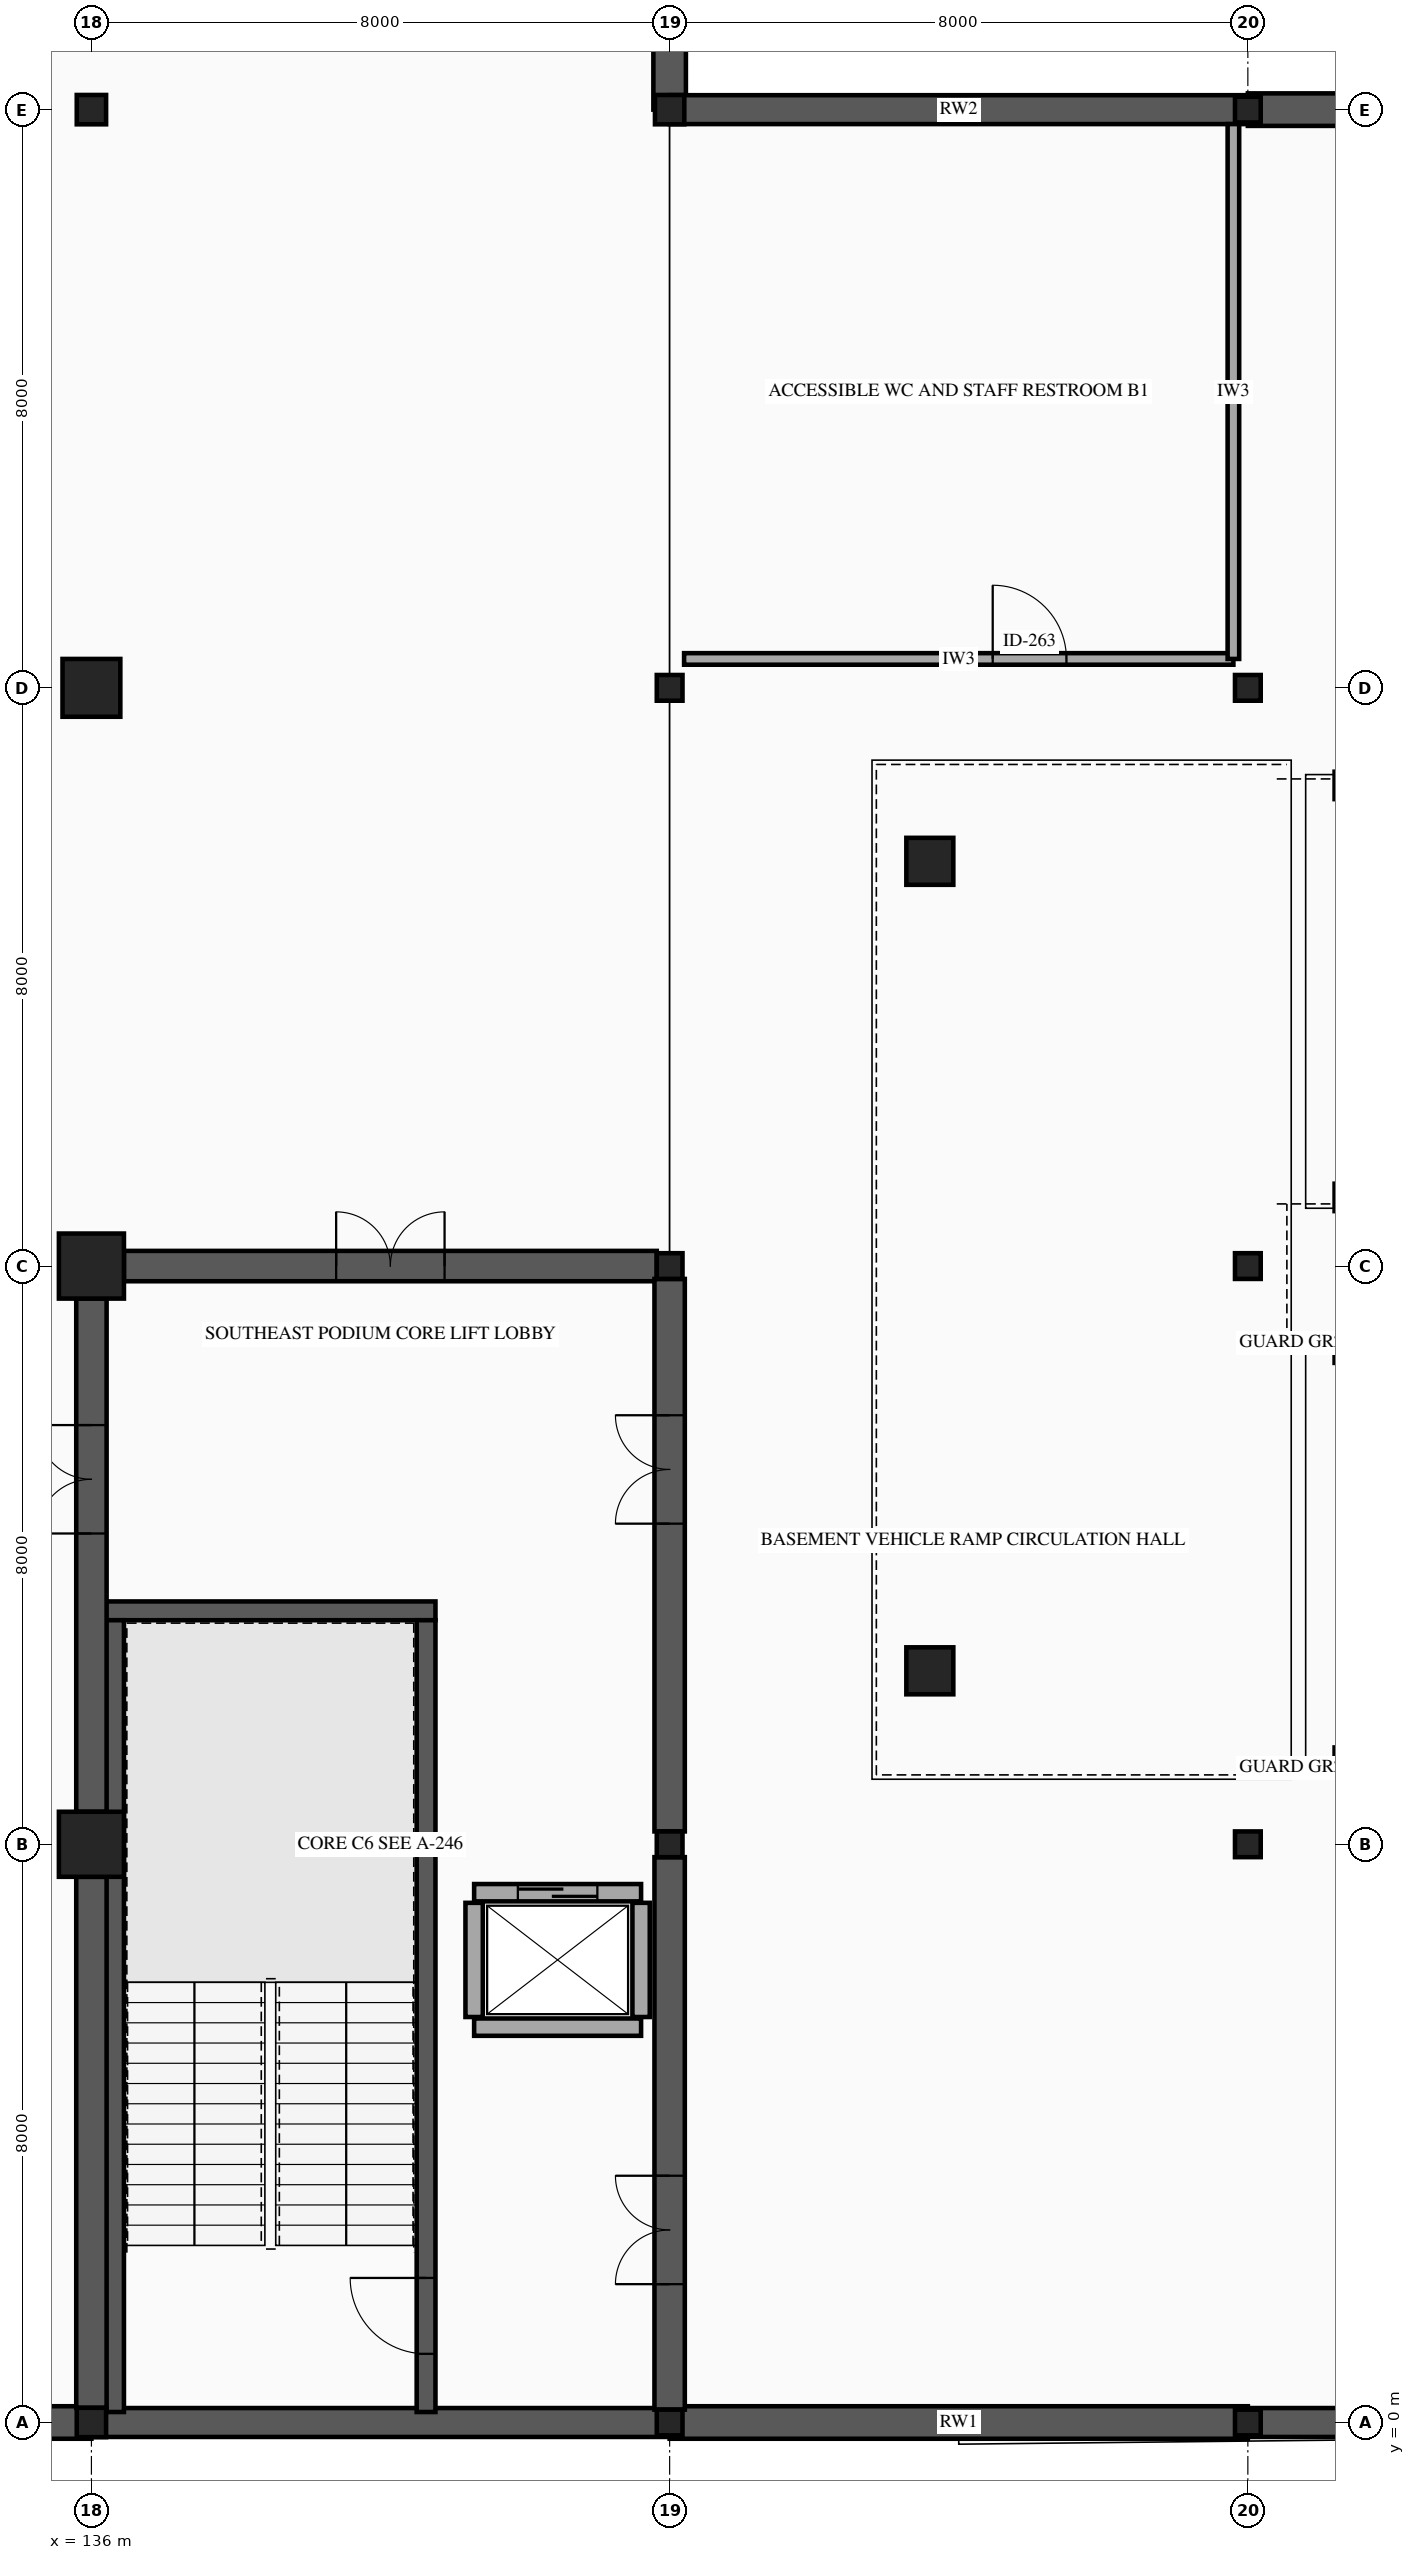
"""IFC4 building model, lengths in metres.
Left out: names, types, materials, properties, quantities, classifications, styles, units other than length and angle.
Written with IfcOpenShell. Run it as: python <this file> out.ifc"""

import sys

from ifc_helpers import new_model, si_unit, direction, frame, frame_2d, origin, origin_2d, place, context, subcontext, project, spatial, rectangle, hollow_rectangle, hollow_circle, extrude, element, fill, save


model = new_model("IFC4")
c1 = context("Model", 3, precision=1e-05, world=origin(), true_north=direction((0.0, 1.0)))
c2 = subcontext(c1, "Body", "Model", "MODEL_VIEW")
j1 = project(units=[si_unit("LENGTHUNIT", "METRE"), si_unit("PLANEANGLEUNIT", "RADIAN")], contexts=[c1])
p1 = place(None, origin())
s1 = spatial("IfcSite", under=j1, at=p1, CompositionType="ELEMENT")
p2 = place(p1, origin())
s2 = spatial("IfcBuilding", under=s1, at=p2, CompositionType="ELEMENT")
p3 = place(p2, frame((0.0, 0.0, -4.8)))
s3 = spatial("IfcBuildingStorey", under=s2, at=p3, CompositionType="ELEMENT", Elevation=-4.8)
p4 = place(p3, frame((136.0, 0.0, 0.0), z_axis=(0.0, 0.0, 1.0), x_axis=(1.0, 0.0, 0.0)))
e1 = element("IfcColumn", 1, at=p4, inside=s3, PredefinedType="COLUMN", context=c2, shape_type="SweptSolid", body=[
    extrude(hollow_rectangle(XDim=0.406, YDim=0.406, WallThickness=0.015, InnerFilletRadius=0.015, OuterFilletRadius=0.029, at=origin_2d()), origin(), (0.0, 0.0, 1.0), 4.8),
])
for number, where, z_axis, x_axis in (
    (2, (136.0, 8.0, 0.0), (0.0, 0.0, 1.0), (1.0, 0.0, 0.0)),
    (3, (136.0, 16.0, 0.0), (0.0, 0.0, 1.0), (1.0, 0.0, 0.0)),
):
    element("IfcColumn", number, at=place(p3, frame(where, z_axis=z_axis, x_axis=x_axis)), inside=s3, PredefinedType="COLUMN", context=c2, shape_type="SweptSolid", body=[
        extrude(rectangle(XDim=0.9, YDim=0.9, at=origin_2d()), origin(), (0.0, 0.0, 1.0), 4.8),
    ])
p5 = place(p3, frame((136.0, 24.0, 0.0), z_axis=(0.0, 0.0, 1.0), x_axis=(1.0, 0.0, 0.0)))
e4 = element("IfcColumn", 4, at=p5, inside=s3, PredefinedType="COLUMN", context=c2, shape_type="SweptSolid", body=[
    extrude(rectangle(XDim=0.8, YDim=0.8, at=origin_2d()), origin(), (0.0, 0.0, 1.0), 4.8),
])
p6 = place(p3, frame((136.0, 32.0, 0.0), z_axis=(0.0, 0.0, 1.0), x_axis=(1.0, 0.0, 0.0)))
e5 = element("IfcColumn", 5, at=p6, inside=s3, PredefinedType="COLUMN", context=c2, shape_type="SweptSolid", body=[
    extrude(hollow_circle(Radius=0.203, WallThickness=0.012, at=origin_2d()), origin(), (0.0, 0.0, 1.0), 4.8),
])
for number, where, z_axis, x_axis in (
    (6, (144.0, 0.0, 0.0), (0.0, 0.0, 1.0), (1.0, 0.0, 0.0)),
    (7, (144.0, 8.0, 0.0), (0.0, 0.0, 1.0), (1.0, 0.0, 0.0)),
    (8, (144.0, 16.0, 0.0), (0.0, 0.0, 1.0), (1.0, 0.0, 0.0)),
    (9, (144.0, 24.0, 0.0), (0.0, 0.0, 1.0), (1.0, 0.0, 0.0)),
):
    element("IfcColumn", number, at=place(p3, frame(where, z_axis=z_axis, x_axis=x_axis)), inside=s3, PredefinedType="COLUMN", context=c2, shape_type="SweptSolid", body=[
        extrude(hollow_rectangle(XDim=0.356, YDim=0.356, WallThickness=0.012, InnerFilletRadius=0.012, OuterFilletRadius=0.024, at=origin_2d()), origin(), (0.0, 0.0, 1.0), 4.8),
    ])
p7 = place(p3, frame((144.0, 32.0, 0.0), z_axis=(0.0, 0.0, 1.0), x_axis=(1.0, 0.0, 0.0)))
e10 = element("IfcColumn", 10, at=p7, inside=s3, PredefinedType="COLUMN", context=c2, shape_type="SweptSolid", body=[
    extrude(hollow_circle(Radius=0.203, WallThickness=0.012, at=origin_2d()), origin(), (0.0, 0.0, 1.0), 4.8),
])
for number, where, z_axis, x_axis in (
    (11, (152.0, 0.0, 0.0), (0.0, 0.0, 1.0), (1.0, 0.0, 0.0)),
    (12, (152.0, 8.0, 0.0), (0.0, 0.0, 1.0), (1.0, 0.0, 0.0)),
    (13, (152.0, 16.0, 0.0), (0.0, 0.0, 1.0), (1.0, 0.0, 0.0)),
    (14, (152.0, 24.0, 0.0), (0.0, 0.0, 1.0), (1.0, 0.0, 0.0)),
    (15, (152.0, 32.0, 0.0), (0.0, 0.0, 1.0), (1.0, 0.0, 0.0)),
):
    element("IfcColumn", number, at=place(p3, frame(where, z_axis=z_axis, x_axis=x_axis)), inside=s3, PredefinedType="COLUMN", context=c2, shape_type="SweptSolid", body=[
        extrude(hollow_rectangle(XDim=0.356, YDim=0.356, WallThickness=0.012, InnerFilletRadius=0.012, OuterFilletRadius=0.024, at=origin_2d()), origin(), (0.0, 0.0, 1.0), 4.8),
    ])
p8 = place(p3, frame((160.0, 0.0, 0.0), z_axis=(0.0, 0.0, 1.0), x_axis=(-1.0, 0.0, 0.0)))
e16 = element("IfcWall", 16, at=p8, inside=s3, PredefinedType="USERDEFINED", context=c2, shape_type="SweptSolid", body=[
    extrude(rectangle(XDim=8.0, YDim=0.4, at=frame_2d((4.0, 0.0))), origin(), (0.0, 0.0, 1.0), 4.5),
])
p9 = place(p3, frame((152.0, 0.0, 0.0), z_axis=(0.0, 0.0, 1.0), x_axis=(-1.0, 0.0, 0.0)))
e17 = element("IfcWall", 17, at=p9, inside=s3, PredefinedType="USERDEFINED", context=c2, shape_type="SweptSolid", body=[
    extrude(rectangle(XDim=8.0, YDim=0.45, at=frame_2d((4.0, 0.0))), origin(), (0.0, 0.0, 1.0), 4.5),
])
p10 = place(p3, frame((144.0, 0.0, 0.0), z_axis=(0.0, 0.0, 1.0), x_axis=(-1.0, 0.0, 0.0)))
e18 = element("IfcWall", 18, at=p10, inside=s3, PredefinedType="USERDEFINED", context=c2, shape_type="SweptSolid", body=[
    extrude(rectangle(XDim=8.0, YDim=0.4, at=frame_2d((4.0, 0.0))), origin(), (0.0, 0.0, 1.0), 4.5),
])
for number, where, z_axis, x_axis in (
    (19, (136.0, 0.0, 0.0), (0.0, 0.0, 1.0), (-1.0, 0.0, 0.0)),
    (20, (144.0, 40.0, 0.0), (0.0, 0.0, 1.0), (0.0, -1.0, 0.0)),
):
    element("IfcWall", number, at=place(p3, frame(where, z_axis=z_axis, x_axis=x_axis)), inside=s3, PredefinedType="USERDEFINED", context=c2, shape_type="SweptSolid", body=[
        extrude(rectangle(XDim=8.0, YDim=0.45, at=frame_2d((4.0, 0.0))), origin(), (0.0, 0.0, 1.0), 4.5),
    ])
p11 = place(p3, frame((144.0, 32.0, 0.0), z_axis=(0.0, 0.0, 1.0), x_axis=(1.0, 0.0, 0.0)))
e21 = element("IfcWall", 21, at=p11, inside=s3, PredefinedType="USERDEFINED", context=c2, shape_type="SweptSolid", body=[
    extrude(rectangle(XDim=8.0, YDim=0.4, at=frame_2d((4.0, 0.0))), origin(), (0.0, 0.0, 1.0), 4.5),
])
p12 = place(p3, frame((152.0, 32.0, 0.0), z_axis=(0.0, 0.0, 1.0), x_axis=(1.0, 0.0, 0.0)))
e22 = element("IfcWall", 22, at=p12, inside=s3, PredefinedType="USERDEFINED", context=c2, shape_type="SweptSolid", body=[
    extrude(rectangle(XDim=8.0, YDim=0.45, at=frame_2d((4.0, 0.0))), origin(), (0.0, 0.0, 1.0), 4.5),
])
p13 = place(p3, frame((136.19, 11.23, 0.0), z_axis=(0.0, 0.0, 1.0), x_axis=(1.0, 0.0, 0.0)))
e23 = element("IfcWall", 23, at=p13, inside=s3, PredefinedType="SHEAR", context=c2, shape_type="SweptSolid", body=[
    extrude(rectangle(XDim=4.57, YDim=0.26, at=frame_2d((2.285, 0.0))), origin(), (0.0, 0.0, 1.0), 4.58),
])
p14 = place(p3, frame((136.32, 0.145, 0.0), z_axis=(0.0, 0.0, 1.0), x_axis=(0.0, 1.0, 0.0)))
e24 = element("IfcWall", 24, at=p14, inside=s3, PredefinedType="SHEAR", context=c2, shape_type="SweptSolid", body=[
    extrude(rectangle(XDim=10.955, YDim=0.26, at=frame_2d((5.478, 0.0))), origin(), (0.0, 0.0, 1.0), 4.58),
])
p15 = place(p3, frame((140.63, 0.145, 0.0), z_axis=(0.0, 0.0, 1.0), x_axis=(0.0, 1.0, 0.0)))
e25 = element("IfcWall", 25, at=p15, inside=s3, PredefinedType="SHEAR", context=c2, shape_type="SweptSolid", body=[
    extrude(rectangle(XDim=10.955, YDim=0.26, at=frame_2d((5.478, 0.0))), origin(), (0.0, 0.0, 1.0), 4.58),
])
p16 = place(p15, frame((0.805, 0.0, 0.0)))
e26 = element("IfcOpeningElement", 26, at=p16, cuts=e25, PredefinedType="OPENING", context=c2, shape_type="SweptSolid", body=[
    extrude(rectangle(XDim=1.05, YDim=2.15, at=frame_2d((0.525, 1.075))), frame((0.0, 0.14, 0.0), z_axis=(0.0, -1.0, 0.0), x_axis=(1.0, 0.0, 0.0)), (0.0, 0.0, 1.0), 0.28),
])
p17 = place(p3, frame((136.45, 16.0, 0.0), z_axis=(0.0, 0.0, 1.0), x_axis=(1.0, 0.0, 0.0)))
e27 = element("IfcWall", 27, at=p17, inside=s3, PredefinedType="SHEAR", context=c2, shape_type="SweptSolid", body=[
    extrude(rectangle(XDim=7.372, YDim=0.42, at=frame_2d((3.686, 0.0))), origin(), (0.0, 0.0, 1.0), 4.58),
])
p18 = place(p17, frame((2.936, 0.0, 0.0)))
e28 = element("IfcOpeningElement", 28, at=p18, cuts=e27, PredefinedType="OPENING", context=c2, shape_type="SweptSolid", body=[
    extrude(rectangle(XDim=1.5, YDim=2.15, at=frame_2d((0.75, 1.075))), frame((0.0, 0.22, 0.0), z_axis=(0.0, -1.0, 0.0), x_axis=(1.0, 0.0, 0.0)), (0.0, 0.0, 1.0), 0.44),
])
p19 = place(p3, frame((136.0, 0.203, 0.0), z_axis=(0.0, 0.0, 1.0), x_axis=(0.0, 1.0, 0.0)))
e29 = element("IfcWall", 29, at=p19, inside=s3, PredefinedType="SHEAR", context=c2, shape_type="SweptSolid", body=[
    extrude(rectangle(XDim=7.347, YDim=0.42, at=frame_2d((3.674, 0.0))), origin(), (0.0, 0.0, 1.0), 4.58),
])
p20 = place(p3, frame((136.0, 8.45, 0.0), z_axis=(0.0, 0.0, 1.0), x_axis=(0.0, 1.0, 0.0)))
e30 = element("IfcWall", 30, at=p20, inside=s3, PredefinedType="SHEAR", context=c2, shape_type="SweptSolid", body=[
    extrude(rectangle(XDim=7.1, YDim=0.42, at=frame_2d((3.55, 0.0))), origin(), (0.0, 0.0, 1.0), 4.58),
])
p21 = place(p20, frame((3.85, 0.0, 0.0)))
e31 = element("IfcOpeningElement", 31, at=p21, cuts=e30, PredefinedType="OPENING", context=c2, shape_type="SweptSolid", body=[
    extrude(rectangle(XDim=1.5, YDim=2.15, at=frame_2d((0.75, 1.075))), frame((0.0, 0.22, 0.0), z_axis=(0.0, -1.0, 0.0), x_axis=(1.0, 0.0, 0.0)), (0.0, 0.0, 1.0), 0.44),
])
p22 = place(p3, frame((144.0, 0.178, 0.0), z_axis=(0.0, 0.0, 1.0), x_axis=(0.0, 1.0, 0.0)))
e32 = element("IfcWall", 32, at=p22, inside=s3, PredefinedType="SHEAR", context=c2, shape_type="SweptSolid", body=[
    extrude(rectangle(XDim=7.644, YDim=0.42, at=frame_2d((3.822, 0.0))), origin(), (0.0, 0.0, 1.0), 4.58),
])
p23 = place(p22, frame((1.736, 0.0, 0.0)))
e33 = element("IfcOpeningElement", 33, at=p23, cuts=e32, PredefinedType="OPENING", context=c2, shape_type="SweptSolid", body=[
    extrude(rectangle(XDim=1.5, YDim=2.15, at=frame_2d((0.75, 1.075))), frame((0.0, 0.22, 0.0), z_axis=(0.0, -1.0, 0.0), x_axis=(1.0, 0.0, 0.0)), (0.0, 0.0, 1.0), 0.44),
])
p24 = place(p3, frame((144.0, 8.178, 0.0), z_axis=(0.0, 0.0, 1.0), x_axis=(0.0, 1.0, 0.0)))
e34 = element("IfcWall", 34, at=p24, inside=s3, PredefinedType="SHEAR", context=c2, shape_type="SweptSolid", body=[
    extrude(rectangle(XDim=7.644, YDim=0.42, at=frame_2d((3.822, 0.0))), origin(), (0.0, 0.0, 1.0), 4.58),
])
p25 = place(p24, frame((4.258, 0.0, 0.0)))
e35 = element("IfcOpeningElement", 35, at=p25, cuts=e34, PredefinedType="OPENING", context=c2, shape_type="SweptSolid", body=[
    extrude(rectangle(XDim=1.5, YDim=2.15, at=frame_2d((0.75, 1.075))), frame((0.0, 0.22, 0.0), z_axis=(0.0, -1.0, 0.0), x_axis=(1.0, 0.0, 0.0)), (0.0, 0.0, 1.0), 0.44),
])
p26 = place(p3, frame((141.295, 7.33, 0.0), z_axis=(0.0, 0.0, 1.0), x_axis=(1.0, 0.0, 0.0)))
e36 = element("IfcWall", 36, at=p26, inside=s3, PredefinedType="PARTITIONING", context=c2, shape_type="SweptSolid", body=[
    extrude(rectangle(XDim=2.31, YDim=0.24, at=frame_2d((1.155, 0.0))), origin(), (0.0, 0.0, 1.0), 4.58),
])
p27 = place(p26, frame((0.605, 0.0, 0.0)))
e37 = element("IfcOpeningElement", 37, at=p27, cuts=e36, PredefinedType="OPENING", context=c2, shape_type="SweptSolid", body=[
    extrude(rectangle(XDim=1.1, YDim=2.15, at=frame_2d((0.55, 1.075))), frame((0.0, 0.13, 0.0), z_axis=(0.0, -1.0, 0.0), x_axis=(1.0, 0.0, 0.0)), (0.0, 0.0, 1.0), 0.26),
])
p28 = place(p3, frame((141.295, 5.47, 0.0), z_axis=(0.0, 0.0, 1.0), x_axis=(1.0, 0.0, 0.0)))
e38 = element("IfcWall", 38, at=p28, inside=s3, PredefinedType="PARTITIONING", context=c2, shape_type="SweptSolid", body=[
    extrude(rectangle(XDim=2.31, YDim=0.24, at=frame_2d((1.155, 0.0))), origin(), (0.0, 0.0, 1.0), 4.58),
])
for number, where, z_axis, x_axis in (
    (39, (141.295, 5.61, 0.0), (0.0, 0.0, 1.0), (0.0, 1.0, 0.0)),
    (40, (143.605, 5.61, 0.0), (0.0, 0.0, 1.0), (0.0, 1.0, 0.0)),
):
    element("IfcWall", number, at=place(p3, frame(where, z_axis=z_axis, x_axis=x_axis)), inside=s3, PredefinedType="PARTITIONING", context=c2, shape_type="SweptSolid", body=[
        extrude(rectangle(XDim=1.58, YDim=0.24, at=frame_2d((0.79, 0.0))), origin(), (0.0, 0.0, 1.0), 4.58),
    ])
for number, where, z_axis, x_axis in (
    (41, (147.6, 10.4, 0.0), (0.0, 0.0, 1.0), (1.0, 0.0, 0.0)),
    (42, (147.6, 21.6, 0.0), (0.0, 0.0, 1.0), (1.0, 0.0, 0.0)),
):
    element("IfcColumn", number, at=place(p3, frame(where, z_axis=z_axis, x_axis=x_axis)), inside=s3, PredefinedType="COLUMN", context=c2, shape_type="SweptSolid", body=[
        extrude(rectangle(XDim=0.65, YDim=0.65, at=origin_2d()), origin(), (0.0, 0.0, 1.0), 2.05),
    ])
p29 = place(p3, frame((144.2, 24.4, 0.0), z_axis=(0.0, 0.0, 1.0), x_axis=(1.0, 0.0, 0.0)))
e43 = element("IfcWall", 43, at=p29, inside=s3, PredefinedType="PARTITIONING", context=c2, shape_type="SweptSolid", body=[
    extrude(rectangle(XDim=7.6, YDim=0.16, at=frame_2d((3.8, 0.0))), origin(), (0.0, 0.0, 1.0), 3.78),
])
p30 = place(p29, frame((4.27, 0.0, 0.0)))
e44 = element("IfcOpeningElement", 44, at=p30, cuts=e43, PredefinedType="OPENING", context=c2, shape_type="SweptSolid", body=[
    extrude(rectangle(XDim=1.02, YDim=2.1, at=frame_2d((0.51, 1.05))), frame((0.0, 0.09, 0.0), z_axis=(0.0, -1.0, 0.0), x_axis=(1.0, 0.0, 0.0)), (0.0, 0.0, 1.0), 0.18),
])
p31 = place(p3, frame((151.8, 24.4, 0.0), z_axis=(0.0, 0.0, 1.0), x_axis=(0.0, 1.0, 0.0)))
e45 = element("IfcWall", 45, at=p31, inside=s3, PredefinedType="PARTITIONING", context=c2, shape_type="SweptSolid", body=[
    extrude(rectangle(XDim=7.4, YDim=0.16, at=frame_2d((3.7, 0.0))), origin(), (0.0, 0.0, 1.0), 3.78),
])
p32 = place(p16, origin())
e46 = element("IfcDoor", 46, at=p32, inside=s3, OperationType="SINGLE_SWING_RIGHT", PredefinedType="DOOR", context=c2, shape_type="SweptSolid", body=[
    extrude(rectangle(XDim=1.05, YDim=2.15, at=frame_2d((0.525, 1.075))), frame((0.0, 0.025, 0.0), z_axis=(0.0, -1.0, 0.0), x_axis=(1.0, 0.0, 0.0)), (0.0, 0.0, 1.0), 0.05),
])
fill(e26, e46)
p33 = place(p18, origin())
e47 = element("IfcDoor", 47, at=p33, inside=s3, OperationType="DOUBLE_DOOR_SINGLE_SWING", PredefinedType="DOOR", context=c2, shape_type="SweptSolid", body=[
    extrude(rectangle(XDim=1.5, YDim=2.15, at=frame_2d((0.75, 1.075))), frame((0.0, 0.025, 0.0), z_axis=(0.0, -1.0, 0.0), x_axis=(1.0, 0.0, 0.0)), (0.0, 0.0, 1.0), 0.05),
])
fill(e28, e47)
p34 = place(p21, origin())
e48 = element("IfcDoor", 48, at=p34, inside=s3, OperationType="DOUBLE_DOOR_SINGLE_SWING", PredefinedType="DOOR", context=c2, shape_type="SweptSolid", body=[
    extrude(rectangle(XDim=1.5, YDim=2.15, at=frame_2d((0.75, 1.075))), frame((0.0, 0.025, 0.0), z_axis=(0.0, -1.0, 0.0), x_axis=(1.0, 0.0, 0.0)), (0.0, 0.0, 1.0), 0.05),
])
fill(e31, e48)
p35 = place(p23, origin())
e49 = element("IfcDoor", 49, at=p35, inside=s3, OperationType="DOUBLE_DOOR_SINGLE_SWING", PredefinedType="DOOR", context=c2, shape_type="SweptSolid", body=[
    extrude(rectangle(XDim=1.5, YDim=2.15, at=frame_2d((0.75, 1.075))), frame((0.0, 0.025, 0.0), z_axis=(0.0, -1.0, 0.0), x_axis=(1.0, 0.0, 0.0)), (0.0, 0.0, 1.0), 0.05),
])
fill(e33, e49)
p36 = place(p25, origin())
e50 = element("IfcDoor", 50, at=p36, inside=s3, OperationType="DOUBLE_DOOR_SINGLE_SWING", PredefinedType="DOOR", context=c2, shape_type="SweptSolid", body=[
    extrude(rectangle(XDim=1.5, YDim=2.15, at=frame_2d((0.75, 1.075))), frame((0.0, 0.025, 0.0), z_axis=(0.0, -1.0, 0.0), x_axis=(1.0, 0.0, 0.0)), (0.0, 0.0, 1.0), 0.05),
])
fill(e35, e50)
p37 = place(p27, origin())
e51 = element("IfcDoor", 51, at=p37, inside=s3, OperationType="SLIDING_TO_LEFT", PredefinedType="DOOR", context=c2, shape_type="SweptSolid", body=[
    extrude(rectangle(XDim=1.1, YDim=2.15, at=frame_2d((0.55, 1.075))), frame((0.0, 0.025, 0.0), z_axis=(0.0, -1.0, 0.0), x_axis=(1.0, 0.0, 0.0)), (0.0, 0.0, 1.0), 0.05),
])
fill(e37, e51)
p38 = place(p30, origin())
e52 = element("IfcDoor", 52, at=p38, inside=s3, OperationType="SINGLE_SWING_LEFT", PredefinedType="DOOR", context=c2, shape_type="SweptSolid", body=[
    extrude(rectangle(XDim=1.02, YDim=2.1, at=frame_2d((0.51, 1.05))), frame((0.0, 0.025, 0.0), z_axis=(0.0, -1.0, 0.0), x_axis=(1.0, 0.0, 0.0)), (0.0, 0.0, 1.0), 0.05),
])
fill(e44, e52)
save(model, sys.argv[1])
